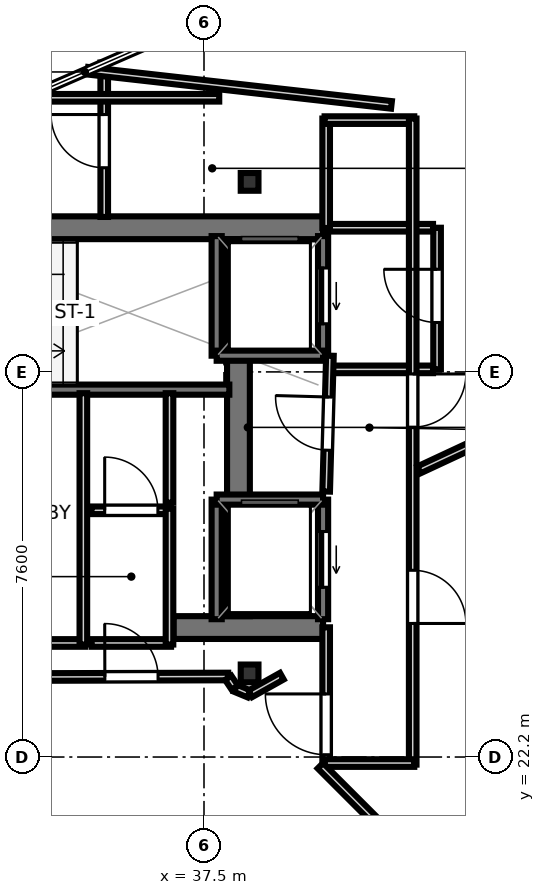
"""IFC4 building model, lengths in metres.
Left out: names, types, materials, properties, quantities, classifications, styles, units other than length and angle.
Written with IfcOpenShell. Run it as: python <this file> out.ifc"""

import sys

from ifc_helpers import new_model, si_unit, direction, frame, frame_2d, origin, origin_2d, place, context, subcontext, project, spatial, rectangle, i_section, extrude, element, fill, save


model = new_model("IFC4")
c1 = context("Model", 3, precision=1e-05, world=origin(), true_north=direction((0.0, 1.0)))
c2 = subcontext(c1, "Body", "Model", "MODEL_VIEW")
j1 = project(units=[si_unit("LENGTHUNIT", "METRE"), si_unit("PLANEANGLEUNIT", "RADIAN")], contexts=[c1])
p1 = place(None, origin())
s1 = spatial("IfcSite", under=j1, at=p1, CompositionType="ELEMENT")
p2 = place(p1, origin())
s2 = spatial("IfcBuilding", under=s1, at=p2, CompositionType="ELEMENT")
p3 = place(p2, frame((0.0, 0.0, 360.05)))
s3 = spatial("IfcBuildingStorey", under=s2, at=p3, CompositionType="ELEMENT", Elevation=360.05)
p4 = place(p3, frame((29.33, 32.645, 0.0), z_axis=(0.0, 0.0, 1.0), x_axis=(1.0, 0.0, 0.0)))
e1 = element("IfcWall", 1, at=p4, inside=s3, PredefinedType="SHEAR", context=c2, shape_type="SweptSolid", body=[
    extrude(rectangle(XDim=10.52, YDim=0.45, at=frame_2d((5.26, 0.0))), origin(), (0.0, 0.0, 1.0), 3.55),
])
p5 = place(p3, frame((36.9, 24.755, 0.0), z_axis=(0.0, 0.0, 1.0), x_axis=(1.0, 0.0, 0.0)))
e2 = element("IfcWall", 2, at=p5, inside=s3, PredefinedType="SHEAR", context=c2, shape_type="SweptSolid", body=[
    extrude(rectangle(XDim=2.95, YDim=0.45, at=frame_2d((1.475, 0.0))), origin(), (0.0, 0.0, 1.0), 3.55),
])
p6 = place(p3, frame((38.18, 24.98, 0.0), z_axis=(0.0, 0.0, 1.0), x_axis=(0.0, 1.0, 0.0)))
e3 = element("IfcWall", 3, at=p6, inside=s3, PredefinedType="SHEAR", context=c2, shape_type="SweptSolid", body=[
    extrude(rectangle(XDim=7.44, YDim=0.45, at=frame_2d((3.72, 0.0))), origin(), (0.0, 0.0, 1.0), 3.55),
])
for number, where, z_axis, x_axis in (
    (4, (38.4, 33.55, 0.0), (0.0, 0.0, 1.0), (1.0, 0.0, 0.0)),
    (5, (38.4, 23.85, 0.0), (0.0, 0.0, 1.0), (1.0, 0.0, 0.0)),
):
    element("IfcColumn", number, at=place(p3, frame(where, z_axis=z_axis, x_axis=x_axis)), inside=s3, PredefinedType="COLUMN", context=c2, shape_type="SweptSolid", body=[
        extrude(i_section(OverallWidth=0.35, OverallDepth=0.35, WebThickness=0.012, FlangeThickness=0.019, at=origin_2d()), origin(), (0.0, 0.0, 1.0), 3.75),
    ])
p7 = place(p3, frame((29.7, 29.45, 0.0), z_axis=(0.0, 0.0, 1.0), x_axis=(1.0, 0.0, 0.0)))
e6 = element("IfcWall", 6, at=p7, inside=s3, PredefinedType="SOLIDWALL", context=c2, shape_type="SweptSolid", body=[
    extrude(rectangle(XDim=8.3, YDim=0.2, at=frame_2d((4.15, 0.0))), origin(), (0.0, 0.0, 1.0), 3.55),
])
p8 = place(p7, frame((0.595, 0.0, 0.0)))
e7 = element("IfcOpeningElement", 7, at=p8, cuts=e6, PredefinedType="OPENING", context=c2, shape_type="SweptSolid", body=[
    extrude(rectangle(XDim=1.25, YDim=2.15, at=frame_2d((0.625, 1.075))), frame((0.0, 0.11, 0.0), z_axis=(0.0, -1.0, 0.0), x_axis=(1.0, 0.0, 0.0)), (0.0, 0.0, 1.0), 0.22),
])
p9 = place(p3, frame((39.85, 30.12, 0.0), z_axis=(0.0, 0.0, 1.0), x_axis=(0.0, 1.0, 0.0)))
e8 = element("IfcWall", 8, at=p9, inside=s3, PredefinedType="SOLIDWALL", context=c2, shape_type="SweptSolid", body=[
    extrude(rectangle(XDim=2.36, YDim=0.2, at=frame_2d((1.18, 0.0))), origin(), (0.0, 0.0, 1.0), 3.55),
])
p10 = place(p9, frame((0.63, 0.0, 0.0)))
e9 = element("IfcOpeningElement", 9, at=p10, cuts=e8, PredefinedType="OPENING", context=c2, shape_type="SweptSolid", body=[
    extrude(rectangle(XDim=1.1, YDim=2.15, at=frame_2d((0.55, 1.075))), frame((0.0, 0.11, 0.0), z_axis=(0.0, -1.0, 0.0), x_axis=(1.0, 0.0, 0.0)), (0.0, 0.0, 1.0), 0.22),
])
p11 = place(p3, frame((37.75, 30.12, 0.0), z_axis=(0.0, 0.0, 1.0), x_axis=(0.0, 1.0, 0.0)))
e10 = element("IfcWall", 10, at=p11, inside=s3, PredefinedType="SOLIDWALL", context=c2, shape_type="SweptSolid", body=[
    extrude(rectangle(XDim=2.36, YDim=0.2, at=frame_2d((1.18, 0.0))), origin(), (0.0, 0.0, 1.0), 3.55),
])
p12 = place(p3, frame((37.75, 30.12, 0.0), z_axis=(0.0, 0.0, 1.0), x_axis=(1.0, 0.0, 0.0)))
e11 = element("IfcWall", 11, at=p12, inside=s3, PredefinedType="SOLIDWALL", context=c2, shape_type="SweptSolid", body=[
    extrude(rectangle(XDim=2.1, YDim=0.2, at=frame_2d((1.05, 0.0))), origin(), (0.0, 0.0, 1.0), 3.55),
])
p13 = place(p3, frame((39.85, 24.92, 0.0), z_axis=(0.0, 0.0, 1.0), x_axis=(0.0, 1.0, 0.0)))
e12 = element("IfcWall", 12, at=p13, inside=s3, PredefinedType="SOLIDWALL", context=c2, shape_type="SweptSolid", body=[
    extrude(rectangle(XDim=2.36, YDim=0.2, at=frame_2d((1.18, 0.0))), origin(), (0.0, 0.0, 1.0), 3.55),
])
p14 = place(p13, frame((0.63, 0.0, 0.0)))
e13 = element("IfcOpeningElement", 13, at=p14, cuts=e12, PredefinedType="OPENING", context=c2, shape_type="SweptSolid", body=[
    extrude(rectangle(XDim=1.1, YDim=2.15, at=frame_2d((0.55, 1.075))), frame((0.0, 0.11, 0.0), z_axis=(0.0, -1.0, 0.0), x_axis=(1.0, 0.0, 0.0)), (0.0, 0.0, 1.0), 0.22),
])
p15 = place(p3, frame((37.75, 24.92, 0.0), z_axis=(0.0, 0.0, 1.0), x_axis=(0.0, 1.0, 0.0)))
e14 = element("IfcWall", 14, at=p15, inside=s3, PredefinedType="SOLIDWALL", context=c2, shape_type="SweptSolid", body=[
    extrude(rectangle(XDim=2.36, YDim=0.2, at=frame_2d((1.18, 0.0))), origin(), (0.0, 0.0, 1.0), 3.55),
])
p16 = place(p3, frame((37.75, 27.28, 0.0), z_axis=(0.0, 0.0, 1.0), x_axis=(1.0, 0.0, 0.0)))
e15 = element("IfcWall", 15, at=p16, inside=s3, PredefinedType="SOLIDWALL", context=c2, shape_type="SweptSolid", body=[
    extrude(rectangle(XDim=2.1, YDim=0.2, at=frame_2d((1.05, 0.0))), origin(), (0.0, 0.0, 1.0), 3.55),
])
p17 = place(p3, frame((42.1, 29.85, 0.0), z_axis=(0.0, 0.0, 1.0), x_axis=(0.0, 1.0, 0.0)))
e16 = element("IfcWall", 16, at=p17, inside=s3, PredefinedType="PARTITIONING", context=c2, shape_type="SweptSolid", body=[
    extrude(rectangle(XDim=2.795, YDim=0.15, at=frame_2d((1.397, 0.0))), origin(), (0.0, 0.0, 1.0), 2.87),
])
p18 = place(p17, frame((0.925, 0.0, 0.0)))
e17 = element("IfcOpeningElement", 17, at=p18, cuts=e16, PredefinedType="OPENING", context=c2, shape_type="SweptSolid", body=[
    extrude(rectangle(XDim=1.05, YDim=2.15, at=frame_2d((0.525, 1.075))), frame((0.0, 0.085, 0.0), z_axis=(0.0, -1.0, 0.0), x_axis=(1.0, 0.0, 0.0)), (0.0, 0.0, 1.0), 0.17),
])
for number, where, z_axis, x_axis in (
    (18, (39.96, 29.85, 0.0), (0.0, 0.0, 1.0), (1.0, 0.0, 0.0)),
    (19, (39.96, 32.645, 0.0), (0.0, 0.0, 1.0), (1.0, 0.0, 0.0)),
):
    element("IfcWall", number, at=place(p3, frame(where, z_axis=z_axis, x_axis=x_axis)), inside=s3, PredefinedType="PARTITIONING", context=c2, shape_type="SweptSolid", body=[
        extrude(rectangle(XDim=2.06, YDim=0.15, at=frame_2d((1.03, 0.0))), origin(), (0.0, 0.0, 1.0), 2.87),
    ])
p19 = place(p3, frame((35.15, 24.451, 0.0), z_axis=(0.0, 0.0, 1.0), x_axis=(-1.0, 0.0, 0.0)))
e20 = element("IfcWall", 20, at=p19, inside=s3, PredefinedType="PARTITIONING", context=c2, shape_type="SweptSolid", body=[
    extrude(rectangle(XDim=5.55, YDim=0.15, at=frame_2d((2.775, 0.0))), origin(), (0.0, 0.0, 1.0), 2.87),
])
p20 = place(p3, frame((35.119, 29.38, 0.0), z_axis=(0.0, 0.0, 1.0), x_axis=(0.0, -1.0, 0.0)))
e21 = element("IfcWall", 21, at=p20, inside=s3, PredefinedType="PARTITIONING", context=c2, shape_type="SweptSolid", body=[
    extrude(rectangle(XDim=4.96, YDim=0.15, at=frame_2d((2.48, 0.0))), origin(), (0.0, 0.0, 1.0), 2.08),
])
p21 = place(p3, frame((39.911, 22.05, 0.0), z_axis=(0.0, 0.0, 1.0), x_axis=(0.0, 1.0, 0.0)))
e22 = element("IfcWall", 22, at=p21, inside=s3, PredefinedType="PARTITIONING", context=c2, shape_type="SweptSolid", body=[
    extrude(rectangle(XDim=2.71, YDim=0.15, at=frame_2d((1.355, 0.0))), origin(), (0.0, 0.0, 1.0), 2.87),
])
p22 = place(p21, frame((0.195, 0.0, 0.0)))
e23 = element("IfcOpeningElement", 23, at=p22, cuts=e22, PredefinedType="OPENING", context=c2, shape_type="SweptSolid", body=[
    extrude(rectangle(XDim=1.2, YDim=2.15, at=frame_2d((0.6, 1.075))), frame((0.0, 0.085, 0.0), z_axis=(0.0, -1.0, 0.0), x_axis=(1.0, 0.0, 0.0)), (0.0, 0.0, 1.0), 0.17),
])
p23 = place(p3, frame((39.911, 27.439, 0.0), z_axis=(0.0, 0.0, 1.0), x_axis=(0.027673579092, 0.999617013171, 0.0)))
e24 = element("IfcWall", 24, at=p23, inside=s3, PredefinedType="PARTITIONING", context=c2, shape_type="SweptSolid", body=[
    extrude(rectangle(XDim=2.682, YDim=0.15, at=frame_2d((1.341, 0.0))), origin(), (0.0, 0.0, 1.0), 2.87),
])
p24 = place(p23, frame((0.816, 0.0, 0.0)))
e25 = element("IfcOpeningElement", 25, at=p24, cuts=e24, PredefinedType="OPENING", context=c2, shape_type="SweptSolid", body=[
    extrude(rectangle(XDim=1.05, YDim=2.15, at=frame_2d((0.525, 1.075))), frame((0.0, 0.085, 0.0), z_axis=(0.0, -1.0, 0.0), x_axis=(1.0, 0.0, 0.0)), (0.0, 0.0, 1.0), 0.17),
])
p25 = place(p3, frame((39.911, 32.64, 0.0), z_axis=(0.0, 0.0, 1.0), x_axis=(0.0, 1.0, 0.0)))
e26 = element("IfcWall", 26, at=p25, inside=s3, PredefinedType="PARTITIONING", context=c2, shape_type="SweptSolid", body=[
    extrude(rectangle(XDim=2.16, YDim=0.15, at=frame_2d((1.08, 0.0))), origin(), (0.0, 0.0, 1.0), 2.87),
])
p26 = place(p3, frame((39.88, 34.769, 0.0), z_axis=(0.0, 0.0, 1.0), x_axis=(1.0, 0.0, 0.0)))
e27 = element("IfcWall", 27, at=p26, inside=s3, PredefinedType="PARTITIONING", context=c2, shape_type="SweptSolid", body=[
    extrude(rectangle(XDim=1.77, YDim=0.15, at=frame_2d((0.885, 0.0))), origin(), (0.0, 0.0, 1.0), 2.87),
])
p27 = place(p3, frame((41.619, 34.8, 0.0), z_axis=(0.0, 0.0, 1.0), x_axis=(0.0, -1.0, 0.0)))
e28 = element("IfcWall", 28, at=p27, inside=s3, PredefinedType="PARTITIONING", context=c2, shape_type="SweptSolid", body=[
    extrude(rectangle(XDim=12.75, YDim=0.15, at=frame_2d((6.375, 0.0))), origin(), (0.0, 0.0, 1.0), 2.87),
])
p28 = place(p27, frame((8.915, 0.0, 0.0)))
e29 = element("IfcOpeningElement", 29, at=p28, cuts=e28, PredefinedType="OPENING", context=c2, shape_type="SweptSolid", body=[
    extrude(rectangle(XDim=1.05, YDim=2.15, at=frame_2d((0.525, 1.075))), frame((0.0, 0.085, 0.0), z_axis=(0.0, -1.0, 0.0), x_axis=(1.0, 0.0, 0.0)), (0.0, 0.0, 1.0), 0.17),
])
p29 = place(p27, frame((5.041, 0.0, 0.0)))
e30 = element("IfcOpeningElement", 30, at=p29, cuts=e28, PredefinedType="OPENING", context=c2, shape_type="SweptSolid", body=[
    extrude(rectangle(XDim=1.05, YDim=2.15, at=frame_2d((0.525, 1.075))), frame((0.0, 0.085, 0.0), z_axis=(0.0, -1.0, 0.0), x_axis=(1.0, 0.0, 0.0)), (0.0, 0.0, 1.0), 0.17),
])
p30 = place(p3, frame((41.65, 22.081, 0.0), z_axis=(0.0, 0.0, 1.0), x_axis=(-1.0, 0.0, 0.0)))
e31 = element("IfcWall", 31, at=p30, inside=s3, PredefinedType="PARTITIONING", context=c2, shape_type="SweptSolid", body=[
    extrude(rectangle(XDim=1.77, YDim=0.15, at=frame_2d((0.885, 0.0))), origin(), (0.0, 0.0, 1.0), 2.87),
])
p31 = place(p3, frame((36.85, 24.451, 0.0), z_axis=(0.0, 0.0, 1.0), x_axis=(-1.0, 0.0, 0.0)))
e32 = element("IfcWall", 32, at=p31, inside=s3, PredefinedType="PARTITIONING", context=c2, shape_type="SweptSolid", body=[
    extrude(rectangle(XDim=1.57, YDim=0.15, at=frame_2d((0.785, 0.0))), origin(), (0.0, 0.0, 1.0), 2.87),
])
p32 = place(p3, frame((35.28, 27.069, 0.0), z_axis=(0.0, 0.0, 1.0), x_axis=(1.0, 0.0, 0.0)))
e33 = element("IfcWall", 33, at=p32, inside=s3, PredefinedType="PARTITIONING", context=c2, shape_type="SweptSolid", body=[
    extrude(rectangle(XDim=1.57, YDim=0.15, at=frame_2d((0.785, 0.0))), origin(), (0.0, 0.0, 1.0), 2.87),
])
p33 = place(p32, frame((0.26, 0.0, 0.0)))
e34 = element("IfcOpeningElement", 34, at=p33, cuts=e33, PredefinedType="OPENING", context=c2, shape_type="SweptSolid", body=[
    extrude(rectangle(XDim=1.05, YDim=2.15, at=frame_2d((0.525, 1.075))), frame((0.0, 0.085, 0.0), z_axis=(0.0, -1.0, 0.0), x_axis=(1.0, 0.0, 0.0)), (0.0, 0.0, 1.0), 0.17),
])
p34 = place(p3, frame((36.819, 27.1, 0.0), z_axis=(0.0, 0.0, 1.0), x_axis=(0.0, -1.0, 0.0)))
e35 = element("IfcWall", 35, at=p34, inside=s3, PredefinedType="PARTITIONING", context=c2, shape_type="SweptSolid", body=[
    extrude(rectangle(XDim=2.68, YDim=0.15, at=frame_2d((1.34, 0.0))), origin(), (0.0, 0.0, 1.0), 2.87),
])
p35 = place(p3, frame((36.819, 29.38, 0.0), z_axis=(0.0, 0.0, 1.0), x_axis=(0.0, -1.0, 0.0)))
e36 = element("IfcWall", 36, at=p35, inside=s3, PredefinedType="PARTITIONING", context=c2, shape_type="SweptSolid", body=[
    extrude(rectangle(XDim=2.16, YDim=0.15, at=frame_2d((1.08, 0.0))), origin(), (0.0, 0.0, 1.0), 2.87),
])
p36 = place(p3, frame((35.531, 32.858, 0.0), z_axis=(0.0, 0.0, 1.0), x_axis=(0.0, 1.0, 0.0)))
e37 = element("IfcWall", 37, at=p36, inside=s3, PredefinedType="PARTITIONING", context=c2, shape_type="SweptSolid", body=[
    extrude(rectangle(XDim=3.047, YDim=0.15, at=frame_2d((1.524, 0.0))), origin(), (0.0, 0.0, 1.0), 2.87),
])
p37 = place(p36, frame((0.971, 0.0, 0.0)))
e38 = element("IfcOpeningElement", 38, at=p37, cuts=e37, PredefinedType="OPENING", context=c2, shape_type="SweptSolid", body=[
    extrude(rectangle(XDim=1.05, YDim=2.15, at=frame_2d((0.525, 1.075))), frame((0.0, 0.085, 0.0), z_axis=(0.0, -1.0, 0.0), x_axis=(1.0, 0.0, 0.0)), (0.0, 0.0, 1.0), 0.17),
])
p38 = place(p3, frame((35.206, 35.743, 0.0), z_axis=(0.0, 0.0, 1.0), x_axis=(0.993731765799, -0.111790776195, 0.0)))
e39 = element("IfcWall", 39, at=p38, inside=s3, PredefinedType="PARTITIONING", context=c2, shape_type="SweptSolid", body=[
    extrude(rectangle(XDim=6.032, YDim=0.15, at=frame_2d((3.016, 0.0))), origin(), (0.0, 0.0, 1.0), 2.87),
])
p39 = place(p3, frame((29.184, 23.767, 0.0), z_axis=(0.0, 0.0, 1.0), x_axis=(0.999996878137, 0.002498742824, 0.0)))
e40 = element("IfcWall", 40, at=p39, inside=s3, PredefinedType="PARTITIONING", context=c2, shape_type="SweptSolid", body=[
    extrude(rectangle(XDim=8.793, YDim=0.15, at=frame_2d((4.397, 0.0))), origin(), (0.0, 0.0, 1.0), 2.87),
])
p40 = place(p39, frame((2.831, 0.0, 0.0)))
e41 = element("IfcOpeningElement", 41, at=p40, cuts=e40, PredefinedType="OPENING", context=c2, shape_type="SweptSolid", body=[
    extrude(rectangle(XDim=1.2, YDim=2.15, at=frame_2d((0.6, 1.075))), frame((0.0, 0.085, 0.0), z_axis=(0.0, -1.0, 0.0), x_axis=(1.0, 0.0, 0.0)), (0.0, 0.0, 1.0), 0.17),
])
p41 = place(p39, frame((6.359, 0.0, 0.0)))
e42 = element("IfcOpeningElement", 42, at=p41, cuts=e40, PredefinedType="OPENING", context=c2, shape_type="SweptSolid", body=[
    extrude(rectangle(XDim=1.05, YDim=2.15, at=frame_2d((0.525, 1.075))), frame((0.0, 0.085, 0.0), z_axis=(0.0, -1.0, 0.0), x_axis=(1.0, 0.0, 0.0)), (0.0, 0.0, 1.0), 0.17),
])
p42 = place(p39, frame((1.431, 0.0, 0.0)))
e43 = element("IfcOpeningElement", 43, at=p42, cuts=e40, PredefinedType="OPENING", context=c2, shape_type="SweptSolid", body=[
    extrude(rectangle(XDim=1.2, YDim=2.15, at=frame_2d((0.6, 1.075))), frame((0.0, 0.085, 0.0), z_axis=(0.0, -1.0, 0.0), x_axis=(1.0, 0.0, 0.0)), (0.0, 0.0, 1.0), 0.17),
])
p43 = place(p3, frame((37.978, 23.764, 0.0), z_axis=(0.0, 0.0, 1.0), x_axis=(0.556130652598, -0.831094878604, 0.0)))
e44 = element("IfcWall", 44, at=p43, inside=s3, PredefinedType="PARTITIONING", context=c2, shape_type="SweptSolid", body=[
    extrude(rectangle(XDim=0.236, YDim=0.15, at=frame_2d((0.118, 0.0))), origin(), (0.0, 0.0, 1.0), 2.87),
])
p44 = place(p3, frame((38.123, 23.556, 0.0), z_axis=(0.0, 0.0, 1.0), x_axis=(0.92383017907, -0.382802560388, 0.0)))
e45 = element("IfcWall", 45, at=p44, inside=s3, PredefinedType="PARTITIONING", context=c2, shape_type="SweptSolid", body=[
    extrude(rectangle(XDim=0.287, YDim=0.15, at=frame_2d((0.144, 0.0))), origin(), (0.0, 0.0, 1.0), 2.87),
])
p45 = place(p3, frame((38.415, 23.448, 0.0), z_axis=(0.0, 0.0, 1.0), x_axis=(0.872599584194, 0.488436245241, 0.0)))
e46 = element("IfcWall", 46, at=p45, inside=s3, PredefinedType="PARTITIONING", context=c2, shape_type="SweptSolid", body=[
    extrude(rectangle(XDim=0.712, YDim=0.15, at=frame_2d((0.356, 0.0))), origin(), (0.0, 0.0, 1.0), 2.87),
])
p46 = place(p3, frame((39.796, 22.028, 0.0), z_axis=(0.0, 0.0, 1.0), x_axis=(0.707106781187, -0.707106781187, 0.0)))
e47 = element("IfcWall", 47, at=p46, inside=s3, PredefinedType="PARTITIONING", context=c2, shape_type="SweptSolid", body=[
    extrude(rectangle(XDim=2.051, YDim=0.15, at=frame_2d((1.025, 0.0))), origin(), (0.0, 0.0, 1.0), 2.87),
])
p47 = place(p3, frame((41.743, 27.867, 0.0), z_axis=(0.0, 0.0, 1.0), x_axis=(0.906307457026, 0.422618969451, 0.0)))
e48 = element("IfcWall", 48, at=p47, inside=s3, PredefinedType="PARTITIONING", context=c2, shape_type="SweptSolid", body=[
    extrude(rectangle(XDim=8.727, YDim=0.15, at=frame_2d((4.364, 0.0))), origin(), (0.0, 0.0, 1.0), 2.87),
])
p48 = place(p3, frame((37.801, 35.21, 0.0), z_axis=(0.0, 0.0, 1.0), x_axis=(-0.999999981802, -0.000190779011, 0.0)))
e49 = element("IfcWall", 49, at=p48, inside=s3, PredefinedType="PARTITIONING", context=c2, shape_type="SweptSolid", body=[
    extrude(rectangle(XDim=3.839, YDim=0.15, at=frame_2d((1.919, 0.0))), origin(), (0.0, 0.0, 1.0), 2.87),
])
p49 = place(p10, origin())
e50 = element("IfcDoor", 50, at=p49, inside=s3, OperationType="SLIDING_TO_LEFT", PredefinedType="DOOR", context=c2, shape_type="SweptSolid", body=[
    extrude(rectangle(XDim=1.1, YDim=2.15, at=frame_2d((0.55, 1.075))), frame((0.0, 0.025, 0.0), z_axis=(0.0, -1.0, 0.0), x_axis=(1.0, 0.0, 0.0)), (0.0, 0.0, 1.0), 0.05),
])
fill(e9, e50)
p50 = place(p14, origin())
e51 = element("IfcDoor", 51, at=p50, inside=s3, OperationType="SLIDING_TO_LEFT", PredefinedType="DOOR", context=c2, shape_type="SweptSolid", body=[
    extrude(rectangle(XDim=1.1, YDim=2.15, at=frame_2d((0.55, 1.075))), frame((0.0, 0.025, 0.0), z_axis=(0.0, -1.0, 0.0), x_axis=(1.0, 0.0, 0.0)), (0.0, 0.0, 1.0), 0.05),
])
fill(e13, e51)
p51 = place(p18, origin())
e52 = element("IfcDoor", 52, at=p51, inside=s3, OperationType="SINGLE_SWING_RIGHT", PredefinedType="DOOR", context=c2, shape_type="SweptSolid", body=[
    extrude(rectangle(XDim=1.05, YDim=2.15, at=frame_2d((0.525, 1.075))), frame((0.0, 0.025, 0.0), z_axis=(0.0, -1.0, 0.0), x_axis=(1.0, 0.0, 0.0)), (0.0, 0.0, 1.0), 0.05),
])
fill(e17, e52)
p52 = place(p22, origin())
e53 = element("IfcDoor", 53, at=p52, inside=s3, OperationType="SINGLE_SWING_RIGHT", PredefinedType="DOOR", context=c2, shape_type="SweptSolid", body=[
    extrude(rectangle(XDim=1.2, YDim=2.15, at=frame_2d((0.6, 1.075))), frame((0.0, 0.025, 0.0), z_axis=(0.0, -1.0, 0.0), x_axis=(1.0, 0.0, 0.0)), (0.0, 0.0, 1.0), 0.05),
])
fill(e23, e53)
p53 = place(p41, origin())
e54 = element("IfcDoor", 54, at=p53, inside=s3, OperationType="SINGLE_SWING_LEFT", PredefinedType="DOOR", context=c2, shape_type="SweptSolid", body=[
    extrude(rectangle(XDim=1.05, YDim=2.15, at=frame_2d((0.525, 1.075))), frame((0.0, 0.025, 0.0), z_axis=(0.0, -1.0, 0.0), x_axis=(1.0, 0.0, 0.0)), (0.0, 0.0, 1.0), 0.05),
])
fill(e42, e54)
p54 = place(p33, origin())
e55 = element("IfcDoor", 55, at=p54, inside=s3, OperationType="SINGLE_SWING_LEFT", PredefinedType="DOOR", context=c2, shape_type="SweptSolid", body=[
    extrude(rectangle(XDim=1.05, YDim=2.15, at=frame_2d((0.525, 1.075))), frame((0.0, 0.025, 0.0), z_axis=(0.0, -1.0, 0.0), x_axis=(1.0, 0.0, 0.0)), (0.0, 0.0, 1.0), 0.05),
])
fill(e34, e55)
p55 = place(p28, origin())
e56 = element("IfcDoor", 56, at=p55, inside=s3, OperationType="SINGLE_SWING_RIGHT", PredefinedType="DOOR", context=c2, shape_type="SweptSolid", body=[
    extrude(rectangle(XDim=1.05, YDim=2.15, at=frame_2d((0.525, 1.075))), frame((0.0, 0.025, 0.0), z_axis=(0.0, -1.0, 0.0), x_axis=(1.0, 0.0, 0.0)), (0.0, 0.0, 1.0), 0.05),
])
fill(e29, e56)
p56 = place(p29, origin())
e57 = element("IfcDoor", 57, at=p56, inside=s3, OperationType="SINGLE_SWING_LEFT", PredefinedType="DOOR", context=c2, shape_type="SweptSolid", body=[
    extrude(rectangle(XDim=1.05, YDim=2.15, at=frame_2d((0.525, 1.075))), frame((0.0, 0.025, 0.0), z_axis=(0.0, -1.0, 0.0), x_axis=(1.0, 0.0, 0.0)), (0.0, 0.0, 1.0), 0.05),
])
fill(e30, e57)
p57 = place(p24, origin())
e58 = element("IfcDoor", 58, at=p57, inside=s3, OperationType="SINGLE_SWING_RIGHT", PredefinedType="DOOR", context=c2, shape_type="SweptSolid", body=[
    extrude(rectangle(XDim=1.05, YDim=2.15, at=frame_2d((0.525, 1.075))), frame((0.0, 0.025, 0.0), z_axis=(0.0, -1.0, 0.0), x_axis=(1.0, 0.0, 0.0)), (0.0, 0.0, 1.0), 0.05),
])
fill(e25, e58)
p58 = place(p37, origin())
e59 = element("IfcDoor", 59, at=p58, inside=s3, OperationType="SINGLE_SWING_RIGHT", PredefinedType="DOOR", context=c2, shape_type="SweptSolid", body=[
    extrude(rectangle(XDim=1.05, YDim=2.15, at=frame_2d((0.525, 1.075))), frame((0.0, 0.025, 0.0), z_axis=(0.0, -1.0, 0.0), x_axis=(1.0, 0.0, 0.0)), (0.0, 0.0, 1.0), 0.05),
])
fill(e38, e59)
save(model, sys.argv[1])
